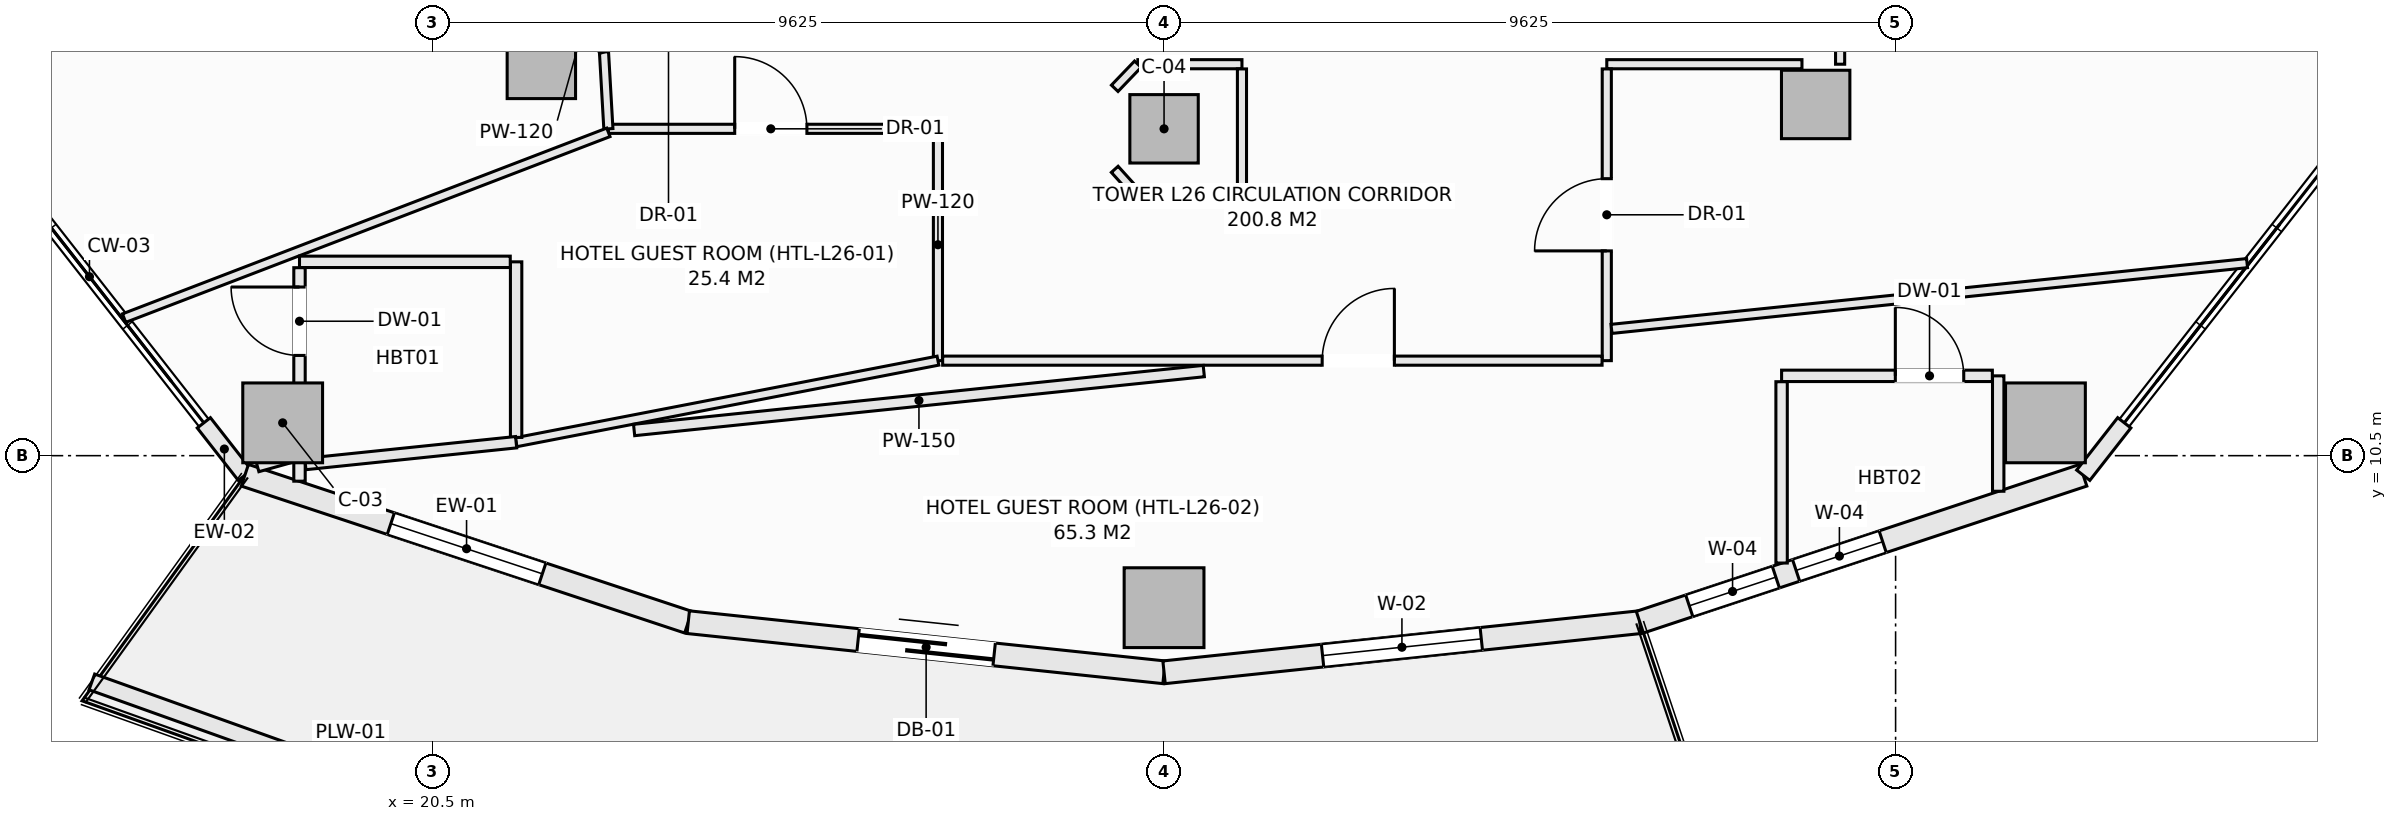
"""IFC4 building model, lengths in metres.
Left out: names, types, materials, properties, quantities, classifications, styles, units other than length and angle.
Written with IfcOpenShell. Run it as: python <this file> out.ifc"""

import sys

from ifc_helpers import new_model, si_unit, direction, frame, frame_2d, origin, origin_2d, place, context, subcontext, project, spatial, rectangle, extrude, element, fill, save


model = new_model("IFC4")
c1 = context("Model", 3, precision=1e-05, world=origin(), true_north=direction((0.0, 1.0)))
c2 = subcontext(c1, "Body", "Model", "MODEL_VIEW")
j1 = project(units=[si_unit("LENGTHUNIT", "METRE"), si_unit("PLANEANGLEUNIT", "RADIAN")], contexts=[c1])
p1 = place(None, origin())
s1 = spatial("IfcSite", under=j1, at=p1, CompositionType="ELEMENT")
p2 = place(p1, origin())
s2 = spatial("IfcBuilding", under=s1, at=p2, CompositionType="ELEMENT")
p3 = place(p2, frame((0.0, 0.0, 108.7)))
s3 = spatial("IfcBuildingStorey", under=s2, at=p3, CompositionType="ELEMENT", Elevation=108.7)
for number, where, z_axis, x_axis in (
    (1, (18.529, 10.932, -0.27), (0.0, 0.0, 1.0), (1.0, 0.0, 0.0)),
    (2, (30.125, 8.5, -0.27), (0.0, 0.0, 1.0), (1.0, 0.0, 0.0)),
    (3, (41.721, 10.932, -0.27), (0.0, 0.0, 1.0), (1.0, 0.0, 0.0)),
):
    element("IfcColumn", number, at=place(p3, frame(where, z_axis=z_axis, x_axis=x_axis)), inside=s3, PredefinedType="COLUMN", context=c2, shape_type="SweptSolid", body=[
        extrude(rectangle(XDim=1.05, YDim=1.05, at=origin_2d()), origin(), (0.0, 0.0, 1.0), 3.4),
    ])
for number, where, z_axis, x_axis in (
    (4, (21.932, 15.648, -0.27), (0.0, 0.0, 1.0), (1.0, 0.0, 0.0)),
    (5, (30.125, 14.8, -0.27), (0.0, 0.0, 1.0), (1.0, 0.0, 0.0)),
    (6, (38.698, 15.121, -0.27), (0.0, 0.0, 1.0), (1.0, 0.0, 0.0)),
):
    element("IfcColumn", number, at=place(p3, frame(where, z_axis=z_axis, x_axis=x_axis)), inside=s3, PredefinedType="COLUMN", context=c2, shape_type="SweptSolid", body=[
        extrude(rectangle(XDim=0.9, YDim=0.9, at=origin_2d()), origin(), (0.0, 0.0, 1.0), 3.4),
    ])
p4 = place(p3, frame((17.491, 10.932, 0.0), z_axis=(0.0, 0.0, 1.0), x_axis=(0.61650363284, -0.787352062736, 0.0)))
e7 = element("IfcWall", 7, at=p4, inside=s3, PredefinedType="SOLIDWALL", context=c2, shape_type="SweptSolid", body=[
    extrude(rectangle(XDim=0.876, YDim=0.22, at=frame_2d((0.438, 0.0))), origin(), (0.0, 0.0, 1.0), 2.653),
])
p5 = place(p3, frame((18.031, 10.242, 0.0), z_axis=(0.0, 0.0, 1.0), x_axis=(0.949238009374, -0.314558741032, 0.0)))
e8 = element("IfcWall", 8, at=p5, inside=s3, PredefinedType="SOLIDWALL", context=c2, shape_type="SweptSolid", body=[
    extrude(rectangle(XDim=6.146, YDim=0.3, at=frame_2d((3.073, 0.0))), origin(), (0.0, 0.0, 1.0), 2.653),
])
p6 = place(p5, frame((2.023, 0.0, 0.74)))
e9 = element("IfcOpeningElement", 9, at=p6, cuts=e8, PredefinedType="OPENING", context=c2, shape_type="SweptSolid", body=[
    extrude(rectangle(XDim=2.1, YDim=1.7, at=frame_2d((1.05, 0.85))), frame((0.0, 0.16, 0.0), z_axis=(0.0, -1.0, 0.0), x_axis=(1.0, 0.0, 0.0)), (0.0, 0.0, 1.0), 0.32),
])
p7 = place(p3, frame((23.865, 8.309, 0.0), z_axis=(0.0, 0.0, 1.0), x_axis=(0.994498012394, -0.104755445421, 0.0)))
e10 = element("IfcWall", 10, at=p7, inside=s3, PredefinedType="SOLIDWALL", context=c2, shape_type="SweptSolid", body=[
    extrude(rectangle(XDim=6.295, YDim=0.3, at=frame_2d((3.147, 0.0))), origin(), (0.0, 0.0, 1.0), 2.653),
])
p8 = place(p7, frame((2.247, 0.0, 0.0)))
e11 = element("IfcOpeningElement", 11, at=p8, cuts=e10, PredefinedType="OPENING", context=c2, shape_type="SweptSolid", body=[
    extrude(rectangle(XDim=1.8, YDim=2.25, at=frame_2d((0.9, 1.125))), frame((0.0, 0.16, 0.0), z_axis=(0.0, -1.0, 0.0), x_axis=(1.0, 0.0, 0.0)), (0.0, 0.0, 1.0), 0.32),
])
p9 = place(p3, frame((30.125, 7.65, 0.0), z_axis=(0.0, 0.0, 1.0), x_axis=(0.994498012394, 0.104755445421, 0.0)))
e12 = element("IfcWall", 12, at=p9, inside=s3, PredefinedType="SOLIDWALL", context=c2, shape_type="SweptSolid", body=[
    extrude(rectangle(XDim=6.295, YDim=0.3, at=frame_2d((3.147, 0.0))), origin(), (0.0, 0.0, 1.0), 2.653),
])
p10 = place(p9, frame((2.097, 0.0, 0.74)))
e13 = element("IfcOpeningElement", 13, at=p10, cuts=e12, PredefinedType="OPENING", context=c2, shape_type="SweptSolid", body=[
    extrude(rectangle(XDim=2.1, YDim=1.7, at=frame_2d((1.05, 0.85))), frame((0.0, 0.16, 0.0), z_axis=(0.0, -1.0, 0.0), x_axis=(1.0, 0.0, 0.0)), (0.0, 0.0, 1.0), 0.32),
])
p11 = place(p3, frame((36.385, 8.309, 0.0), z_axis=(0.0, 0.0, 1.0), x_axis=(0.949238009374, 0.314558741032, 0.0)))
e14 = element("IfcWall", 14, at=p11, inside=s3, PredefinedType="SOLIDWALL", context=c2, shape_type="SweptSolid", body=[
    extrude(rectangle(XDim=6.146, YDim=0.3, at=frame_2d((3.073, 0.0))), origin(), (0.0, 0.0, 1.0), 2.653),
])
p12 = place(p11, frame((0.685, 0.0, 0.74)))
e15 = element("IfcOpeningElement", 15, at=p12, cuts=e14, PredefinedType="OPENING", context=c2, shape_type="SweptSolid", body=[
    extrude(rectangle(XDim=1.2, YDim=1.7, at=frame_2d((0.6, 0.85))), frame((0.0, 0.16, 0.0), z_axis=(0.0, -1.0, 0.0), x_axis=(1.0, 0.0, 0.0)), (0.0, 0.0, 1.0), 0.32),
])
p13 = place(p11, frame((2.166, 0.0, 0.74)))
e16 = element("IfcOpeningElement", 16, at=p13, cuts=e14, PredefinedType="OPENING", context=c2, shape_type="SweptSolid", body=[
    extrude(rectangle(XDim=1.2, YDim=1.7, at=frame_2d((0.6, 0.85))), frame((0.0, 0.16, 0.0), z_axis=(0.0, -1.0, 0.0), x_axis=(1.0, 0.0, 0.0)), (0.0, 0.0, 1.0), 0.32),
])
p14 = place(p3, frame((42.219, 10.242, 0.0), z_axis=(0.0, 0.0, 1.0), x_axis=(0.61650363284, 0.787352062736, 0.0)))
e17 = element("IfcWall", 17, at=p14, inside=s3, PredefinedType="SOLIDWALL", context=c2, shape_type="SweptSolid", body=[
    extrude(rectangle(XDim=0.876, YDim=0.22, at=frame_2d((0.438, 0.0))), origin(), (0.0, 0.0, 1.0), 2.653),
])
p15 = place(p3, frame((16.018, 7.523, 0.0), z_axis=(0.0, 0.0, 1.0), x_axis=(0.941632697311, -0.336642040387, 0.0)))
e18 = element("IfcWall", 18, at=p15, inside=s3, PredefinedType="PARAPET", context=c2, shape_type="SweptSolid", body=[
    extrude(rectangle(XDim=7.236, YDim=0.22, at=frame_2d((3.618, 0.0))), origin(), (0.0, 0.0, 1.0), 0.52),
])
p16 = place(p3, frame((27.15, 11.75, 0.0), z_axis=(0.0, 0.0, 1.0), x_axis=(0.0, 1.0, 0.0)))
e19 = element("IfcWall", 19, at=p16, inside=s3, PredefinedType="PARTITIONING", context=c2, shape_type="SweptSolid", body=[
    extrude(rectangle(XDim=3.05, YDim=0.12, at=frame_2d((1.525, 0.0))), origin(), (0.0, 0.0, 1.0), 3.13),
])
p17 = place(p3, frame((39.02, 15.65, 0.0), z_axis=(0.0, 0.0, 1.0), x_axis=(0.0, 1.0, 0.0)))
e20 = element("IfcWall", 20, at=p17, inside=s3, PredefinedType="PARTITIONING", context=c2, shape_type="SweptSolid", body=[
    extrude(rectangle(XDim=1.36, YDim=0.12, at=frame_2d((0.68, 0.0))), origin(), (0.0, 0.0, 1.0), 2.505),
])
p18 = place(p3, frame((29.78, 15.65, 0.0), z_axis=(0.0, 0.0, 1.0), x_axis=(1.0, 0.0, 0.0)))
e21 = element("IfcWall", 21, at=p18, inside=s3, PredefinedType="PARTITIONING", context=c2, shape_type="SweptSolid", body=[
    extrude(rectangle(XDim=1.37, YDim=0.12, at=frame_2d((0.685, 0.0))), origin(), (0.0, 0.0, 1.0), 3.13),
])
p19 = place(p3, frame((35.95, 15.65, 0.0), z_axis=(0.0, 0.0, 1.0), x_axis=(1.0, 0.0, 0.0)))
e22 = element("IfcWall", 22, at=p19, inside=s3, PredefinedType="PARTITIONING", context=c2, shape_type="SweptSolid", body=[
    extrude(rectangle(XDim=2.568, YDim=0.12, at=frame_2d((1.284, 0.0))), origin(), (0.0, 0.0, 1.0), 3.13),
])
p20 = place(p3, frame((35.95, 11.75, 0.0), z_axis=(0.0, 0.0, 1.0), x_axis=(0.0, 1.0, 0.0)))
e23 = element("IfcWall", 23, at=p20, inside=s3, PredefinedType="PARTITIONING", context=c2, shape_type="SweptSolid", body=[
    extrude(rectangle(XDim=3.838, YDim=0.12, at=frame_2d((1.919, 0.0))), origin(), (0.0, 0.0, 1.0), 3.13),
])
p21 = place(p20, frame((1.444, 0.0, 0.0)))
e24 = element("IfcOpeningElement", 24, at=p21, cuts=e23, PredefinedType="OPENING", context=c2, shape_type="SweptSolid", body=[
    extrude(rectangle(XDim=0.95, YDim=2.1, at=frame_2d((0.475, 1.05))), frame((0.0, 0.07, 0.0), z_axis=(0.0, -1.0, 0.0), x_axis=(1.0, 0.0, 0.0)), (0.0, 0.0, 1.0), 0.14),
])
p22 = place(p3, frame((27.212, 11.75, 0.0), z_axis=(0.0, 0.0, 1.0), x_axis=(1.0, 0.0, 0.0)))
e25 = element("IfcWall", 25, at=p22, inside=s3, PredefinedType="PARTITIONING", context=c2, shape_type="SweptSolid", body=[
    extrude(rectangle(XDim=8.676, YDim=0.12, at=frame_2d((4.338, 0.0))), origin(), (0.0, 0.0, 1.0), 3.13),
])
p23 = place(p22, frame((4.993, 0.0, 0.0)))
e26 = element("IfcOpeningElement", 26, at=p23, cuts=e25, PredefinedType="OPENING", context=c2, shape_type="SweptSolid", body=[
    extrude(rectangle(XDim=0.95, YDim=2.1, at=frame_2d((0.475, 1.05))), frame((0.0, 0.07, 0.0), z_axis=(0.0, -1.0, 0.0), x_axis=(1.0, 0.0, 0.0)), (0.0, 0.0, 1.0), 0.14),
])
p24 = place(p3, frame((22.814, 14.8, 0.0), z_axis=(0.0, 0.0, 1.0), x_axis=(1.0, 0.0, 0.0)))
e27 = element("IfcWall", 27, at=p24, inside=s3, PredefinedType="PARTITIONING", context=c2, shape_type="SweptSolid", body=[
    extrude(rectangle(XDim=4.274, YDim=0.12, at=frame_2d((2.137, 0.0))), origin(), (0.0, 0.0, 1.0), 3.13),
])
p25 = place(p24, frame((1.662, 0.0, 0.0)))
e28 = element("IfcOpeningElement", 28, at=p25, cuts=e27, PredefinedType="OPENING", context=c2, shape_type="SweptSolid", body=[
    extrude(rectangle(XDim=0.95, YDim=2.1, at=frame_2d((0.475, 1.05))), frame((0.0, 0.07, 0.0), z_axis=(0.0, -1.0, 0.0), x_axis=(1.0, 0.0, 0.0)), (0.0, 0.0, 1.0), 0.14),
])
p26 = place(p3, frame((22.756, 15.811, 0.0), z_axis=(0.0, 0.0, 1.0), x_axis=(0.057139047697, -0.998366230012, 0.0)))
e29 = element("IfcWall", 29, at=p26, inside=s3, PredefinedType="PARTITIONING", context=c2, shape_type="SweptSolid", body=[
    extrude(rectangle(XDim=1.013, YDim=0.12, at=frame_2d((0.506, 0.0))), origin(), (0.0, 0.0, 1.0), 3.13),
])
p27 = place(p3, frame((22.353, 16.958, 0.0), z_axis=(0.0, 0.0, 1.0), x_axis=(0.331370038458, -0.943500873138, 0.0)))
e30 = element("IfcWall", 30, at=p27, inside=s3, PredefinedType="PARTITIONING", context=c2, shape_type="SweptSolid", body=[
    extrude(rectangle(XDim=1.216, YDim=0.12, at=frame_2d((0.608, 0.0))), origin(), (0.0, 0.0, 1.0), 3.13),
])
p28 = place(p3, frame((29.476, 15.333, 0.0), z_axis=(0.0, 0.0, 1.0), x_axis=(0.692219273951, 0.721687243043, 0.0)))
e31 = element("IfcWall", 31, at=p28, inside=s3, PredefinedType="PARTITIONING", context=c2, shape_type="SweptSolid", body=[
    extrude(rectangle(XDim=0.439, YDim=0.12, at=frame_2d((0.22, 0.0))), origin(), (0.0, 0.0, 1.0), 3.13),
])
p29 = place(p3, frame((29.476, 14.267, 0.0), z_axis=(0.0, 0.0, 1.0), x_axis=(0.670659392016, -0.741765448037, 0.0)))
e32 = element("IfcWall", 32, at=p29, inside=s3, PredefinedType="PARTITIONING", context=c2, shape_type="SweptSolid", body=[
    extrude(rectangle(XDim=0.453, YDim=0.12, at=frame_2d((0.227, 0.0))), origin(), (0.0, 0.0, 1.0), 3.13),
])
p30 = place(p3, frame((29.78, 13.85, 0.0), z_axis=(0.0, 0.0, 1.0), x_axis=(1.0, 0.0, 0.0)))
e33 = element("IfcWall", 33, at=p30, inside=s3, PredefinedType="PARTITIONING", context=c2, shape_type="SweptSolid", body=[
    extrude(rectangle(XDim=1.37, YDim=0.12, at=frame_2d((0.685, 0.0))), origin(), (0.0, 0.0, 1.0), 3.13),
])
p31 = place(p3, frame((31.15, 13.912, 0.0), z_axis=(0.0, 0.0, 1.0), x_axis=(0.0, 1.0, 0.0)))
e34 = element("IfcWall", 34, at=p31, inside=s3, PredefinedType="PARTITIONING", context=c2, shape_type="SweptSolid", body=[
    extrude(rectangle(XDim=1.676, YDim=0.12, at=frame_2d((0.838, 0.0))), origin(), (0.0, 0.0, 1.0), 3.13),
])
p32 = place(p3, frame((16.442, 12.31, 0.0), z_axis=(0.0, 0.0, 1.0), x_axis=(0.933669773826, 0.358135105014, 0.0)))
e35 = element("IfcWall", 35, at=p32, inside=s3, PredefinedType="PARTITIONING", context=c2, shape_type="SweptSolid", body=[
    extrude(rectangle(XDim=6.824, YDim=0.12, at=frame_2d((3.412, 0.0))), origin(), (0.0, 0.0, 1.0), 2.505),
])
p33 = place(p3, frame((21.6, 10.677, 0.0), z_axis=(0.0, 0.0, 1.0), x_axis=(0.981818039841, 0.189824489051, 0.0)))
e36 = element("IfcWall", 36, at=p33, inside=s3, PredefinedType="PARTITIONING", context=c2, shape_type="SweptSolid", body=[
    extrude(rectangle(XDim=5.653, YDim=0.12, at=frame_2d((2.826, 0.0))), origin(), (0.0, 0.0, 1.0), 3.13),
])
p34 = place(p3, frame((21.6, 10.74, 0.0), z_axis=(0.0, 0.0, 1.0), x_axis=(0.0, 1.0, 0.0)))
e37 = element("IfcWall", 37, at=p34, inside=s3, PredefinedType="PARTITIONING", context=c2, shape_type="SweptSolid", body=[
    extrude(rectangle(XDim=2.31, YDim=0.15, at=frame_2d((1.155, 0.0))), origin(), (0.0, 0.0, 1.0), 3.13),
])
p35 = place(p3, frame((18.75, 13.05, 0.0), z_axis=(0.0, 0.0, 1.0), x_axis=(1.0, 0.0, 0.0)))
e38 = element("IfcWall", 38, at=p35, inside=s3, PredefinedType="PARTITIONING", context=c2, shape_type="SweptSolid", body=[
    extrude(rectangle(XDim=2.773, YDim=0.15, at=frame_2d((1.386, 0.0))), origin(), (0.0, 0.0, 1.0), 3.13),
])
p36 = place(p3, frame((18.75, 10.164, 0.0), z_axis=(0.0, 0.0, 1.0), x_axis=(0.0, 1.0, 0.0)))
e39 = element("IfcWall", 39, at=p36, inside=s3, PredefinedType="PARTITIONING", context=c2, shape_type="SweptSolid", body=[
    extrude(rectangle(XDim=2.809, YDim=0.15, at=frame_2d((1.404, 0.0))), origin(), (0.0, 0.0, 1.0), 2.505),
])
p37 = place(p36, frame((1.654, 0.0, 0.0)))
e40 = element("IfcOpeningElement", 40, at=p37, cuts=e39, PredefinedType="OPENING", context=c2, shape_type="SweptSolid", body=[
    extrude(rectangle(XDim=0.9, YDim=2.1, at=frame_2d((0.45, 1.05))), frame((0.0, 0.085, 0.0), z_axis=(0.0, -1.0, 0.0), x_axis=(1.0, 0.0, 0.0)), (0.0, 0.0, 1.0), 0.17),
])
p38 = place(p3, frame((18.199, 10.347, 0.0), z_axis=(0.0, 0.0, 1.0), x_axis=(0.963375485417, 0.268156062951, 0.0)))
e41 = element("IfcWall", 41, at=p38, inside=s3, PredefinedType="PARTITIONING", context=c2, shape_type="SweptSolid", body=[
    extrude(rectangle(XDim=0.492, YDim=0.12, at=frame_2d((0.246, 0.0))), origin(), (0.0, 0.0, 1.0), 3.13),
])
p39 = place(p3, frame((18.827, 10.39, 0.0), z_axis=(0.0, 0.0, 1.0), x_axis=(0.99469241194, 0.10289317581, 0.0)))
e42 = element("IfcWall", 42, at=p39, inside=s3, PredefinedType="PARTITIONING", context=c2, shape_type="SweptSolid", body=[
    extrude(rectangle(XDim=2.788, YDim=0.15, at=frame_2d((1.394, 0.0))), origin(), (0.0, 0.0, 1.0), 2.653),
])
p40 = place(p3, frame((23.152, 10.838, 0.0), z_axis=(0.0, 0.0, 1.0), x_axis=(0.994691679475, 0.102900256474, 0.0)))
e43 = element("IfcWall", 43, at=p40, inside=s3, PredefinedType="PARTITIONING", context=c2, shape_type="SweptSolid", body=[
    extrude(rectangle(XDim=7.535, YDim=0.15, at=frame_2d((3.768, 0.0))), origin(), (0.0, 0.0, 1.0), 3.13),
])
p41 = place(p3, frame((36.012, 12.168, 0.0), z_axis=(0.0, 0.0, 1.0), x_axis=(0.994692716247, 0.102890233962, 0.0)))
e44 = element("IfcWall", 44, at=p41, inside=s3, PredefinedType="PARTITIONING", context=c2, shape_type="SweptSolid", body=[
    extrude(rectangle(XDim=8.407, YDim=0.12, at=frame_2d((4.204, 0.0))), origin(), (0.0, 0.0, 1.0), 2.653),
])
p42 = place(p3, frame((41.1, 10.032, 0.0), z_axis=(0.0, 0.0, 1.0), x_axis=(0.0, 1.0, 0.0)))
e45 = element("IfcWall", 45, at=p42, inside=s3, PredefinedType="PARTITIONING", context=c2, shape_type="SweptSolid", body=[
    extrude(rectangle(XDim=1.518, YDim=0.15, at=frame_2d((0.759, 0.0))), origin(), (0.0, 0.0, 1.0), 2.505),
])
p43 = place(p3, frame((38.25, 11.55, 0.0), z_axis=(0.0, 0.0, 1.0), x_axis=(1.0, 0.0, 0.0)))
e46 = element("IfcWall", 46, at=p43, inside=s3, PredefinedType="PARTITIONING", context=c2, shape_type="SweptSolid", body=[
    extrude(rectangle(XDim=2.773, YDim=0.15, at=frame_2d((1.386, 0.0))), origin(), (0.0, 0.0, 1.0), 3.13),
])
p44 = place(p43, frame((1.497, 0.0, 0.0)))
e47 = element("IfcOpeningElement", 47, at=p44, cuts=e46, PredefinedType="OPENING", context=c2, shape_type="SweptSolid", body=[
    extrude(rectangle(XDim=0.9, YDim=2.1, at=frame_2d((0.45, 1.05))), frame((0.0, 0.085, 0.0), z_axis=(0.0, -1.0, 0.0), x_axis=(1.0, 0.0, 0.0)), (0.0, 0.0, 1.0), 0.17),
])
p45 = place(p3, frame((38.25, 9.087, 0.0), z_axis=(0.0, 0.0, 1.0), x_axis=(0.0, 1.0, 0.0)))
e48 = element("IfcWall", 48, at=p45, inside=s3, PredefinedType="PARTITIONING", context=c2, shape_type="SweptSolid", body=[
    extrude(rectangle(XDim=2.385, YDim=0.15, at=frame_2d((1.193, 0.0))), origin(), (0.0, 0.0, 1.0), 3.13),
])
p46 = place(p6, origin())
e49 = element("IfcWindow", 49, at=p46, inside=s3, PartitioningType="SINGLE_PANEL", PredefinedType="WINDOW", context=c2, shape_type="SweptSolid", body=[
    extrude(rectangle(XDim=2.1, YDim=1.7, at=frame_2d((1.05, 0.85))), frame((0.0, 0.03, 0.0), z_axis=(0.0, -1.0, 0.0), x_axis=(1.0, 0.0, 0.0)), (0.0, 0.0, 1.0), 0.06),
])
fill(e9, e49)
p47 = place(p8, frame((1.8, 0.0, 0.0), z_axis=(0.0, 0.0, 1.0), x_axis=(-1.0, 0.0, 0.0)))
e50 = element("IfcDoor", 50, at=p47, inside=s3, OperationType="SLIDING_TO_LEFT", PredefinedType="DOOR", context=c2, shape_type="SweptSolid", body=[
    extrude(rectangle(XDim=1.8, YDim=2.25, at=frame_2d((0.9, 1.125))), frame((0.0, 0.025, 0.0), z_axis=(0.0, -1.0, 0.0), x_axis=(1.0, 0.0, 0.0)), (0.0, 0.0, 1.0), 0.05),
])
fill(e11, e50)
p48 = place(p10, origin())
e51 = element("IfcWindow", 51, at=p48, inside=s3, PartitioningType="SINGLE_PANEL", PredefinedType="WINDOW", context=c2, shape_type="SweptSolid", body=[
    extrude(rectangle(XDim=2.1, YDim=1.7, at=frame_2d((1.05, 0.85))), frame((0.0, 0.03, 0.0), z_axis=(0.0, -1.0, 0.0), x_axis=(1.0, 0.0, 0.0)), (0.0, 0.0, 1.0), 0.06),
])
fill(e13, e51)
p49 = place(p12, origin())
e52 = element("IfcWindow", 52, at=p49, inside=s3, PartitioningType="SINGLE_PANEL", PredefinedType="WINDOW", context=c2, shape_type="SweptSolid", body=[
    extrude(rectangle(XDim=1.2, YDim=1.7, at=frame_2d((0.6, 0.85))), frame((0.0, 0.03, 0.0), z_axis=(0.0, -1.0, 0.0), x_axis=(1.0, 0.0, 0.0)), (0.0, 0.0, 1.0), 0.06),
])
fill(e15, e52)
p50 = place(p25, origin())
e53 = element("IfcDoor", 53, at=p50, inside=s3, OperationType="SINGLE_SWING_LEFT", PredefinedType="DOOR", context=c2, shape_type="SweptSolid", body=[
    extrude(rectangle(XDim=0.95, YDim=2.1, at=frame_2d((0.475, 1.05))), frame((0.0, 0.025, 0.0), z_axis=(0.0, -1.0, 0.0), x_axis=(1.0, 0.0, 0.0)), (0.0, 0.0, 1.0), 0.05),
])
fill(e28, e53)
p51 = place(p23, origin())
e54 = element("IfcDoor", 54, at=p51, inside=s3, OperationType="SINGLE_SWING_RIGHT", PredefinedType="DOOR", context=c2, shape_type="SweptSolid", body=[
    extrude(rectangle(XDim=0.95, YDim=2.1, at=frame_2d((0.475, 1.05))), frame((0.0, 0.025, 0.0), z_axis=(0.0, -1.0, 0.0), x_axis=(1.0, 0.0, 0.0)), (0.0, 0.0, 1.0), 0.05),
])
fill(e26, e54)
p52 = place(p21, origin())
e55 = element("IfcDoor", 55, at=p52, inside=s3, OperationType="SINGLE_SWING_LEFT", PredefinedType="DOOR", context=c2, shape_type="SweptSolid", body=[
    extrude(rectangle(XDim=0.95, YDim=2.1, at=frame_2d((0.475, 1.05))), frame((0.0, 0.025, 0.0), z_axis=(0.0, -1.0, 0.0), x_axis=(1.0, 0.0, 0.0)), (0.0, 0.0, 1.0), 0.05),
])
fill(e24, e55)
p53 = place(p37, origin())
e56 = element("IfcDoor", 56, at=p53, inside=s3, OperationType="SINGLE_SWING_RIGHT", PredefinedType="DOOR", context=c2, shape_type="SweptSolid", body=[
    extrude(rectangle(XDim=0.9, YDim=2.1, at=frame_2d((0.45, 1.05))), frame((0.0, 0.025, 0.0), z_axis=(0.0, -1.0, 0.0), x_axis=(1.0, 0.0, 0.0)), (0.0, 0.0, 1.0), 0.05),
])
fill(e40, e56)
p54 = place(p44, origin())
e57 = element("IfcDoor", 57, at=p54, inside=s3, OperationType="SINGLE_SWING_LEFT", PredefinedType="DOOR", context=c2, shape_type="SweptSolid", body=[
    extrude(rectangle(XDim=0.9, YDim=2.1, at=frame_2d((0.45, 1.05))), frame((0.0, 0.025, 0.0), z_axis=(0.0, -1.0, 0.0), x_axis=(1.0, 0.0, 0.0)), (0.0, 0.0, 1.0), 0.05),
])
fill(e47, e57)
p55 = place(p13, origin())
e58 = element("IfcWindow", 58, at=p55, inside=s3, PartitioningType="SINGLE_PANEL", PredefinedType="WINDOW", context=c2, shape_type="SweptSolid", body=[
    extrude(rectangle(XDim=1.2, YDim=1.7, at=frame_2d((0.6, 0.85))), frame((0.0, 0.03, 0.0), z_axis=(0.0, -1.0, 0.0), x_axis=(1.0, 0.0, 0.0)), (0.0, 0.0, 1.0), 0.06),
])
fill(e16, e58)
save(model, sys.argv[1])
